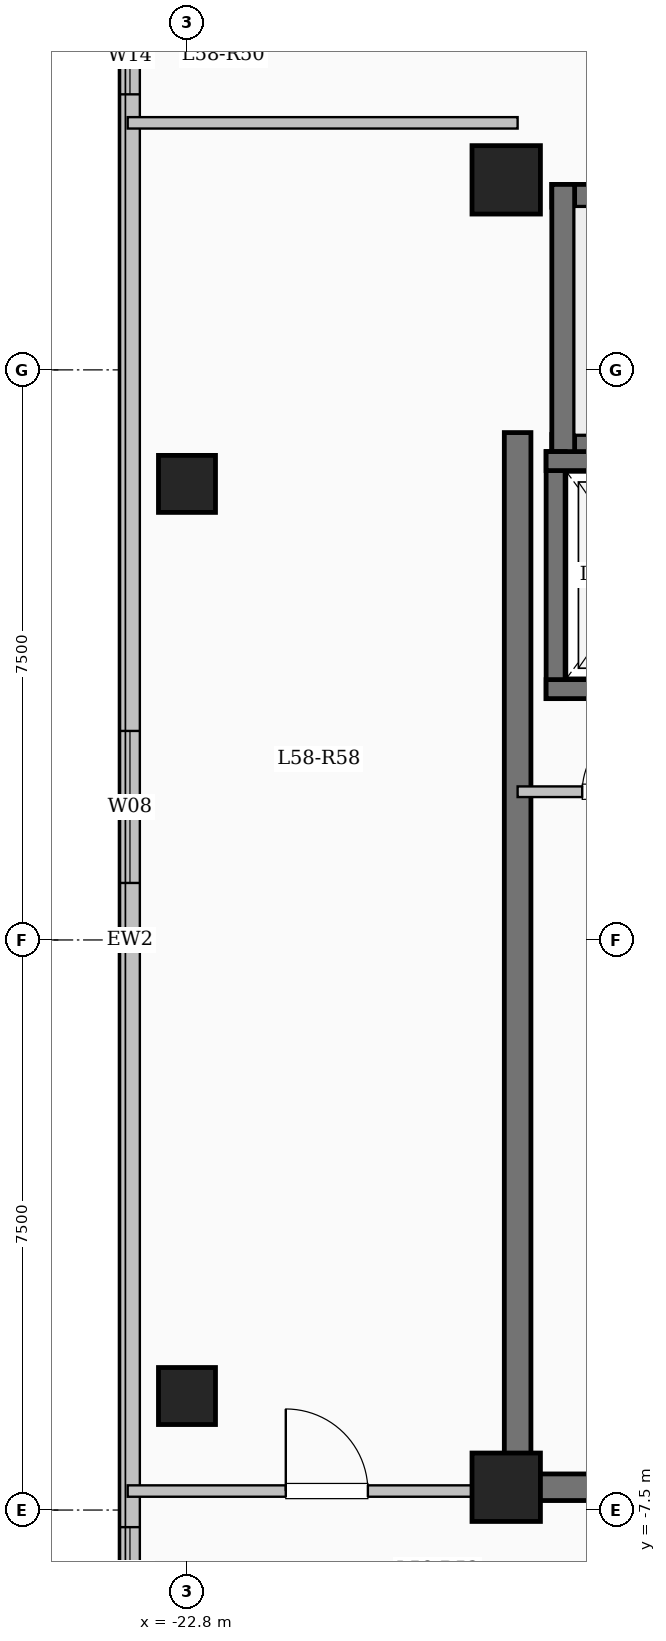
"""IFC4 building model, lengths in metres.
Left out: names, types, materials, properties, quantities, classifications, styles, units other than length and angle.
Written with IfcOpenShell. Run it as: python <this file> out.ifc"""

import sys

from ifc_helpers import new_model, si_unit, direction, frame, frame_2d, origin, origin_2d, place, context, subcontext, project, spatial, rectangle, extrude, element, fill, save


model = new_model("IFC4")
c1 = context("Model", 3, precision=1e-05, world=origin(), true_north=direction((0.0, 1.0)))
c2 = subcontext(c1, "Body", "Model", "MODEL_VIEW")
j1 = project(units=[si_unit("LENGTHUNIT", "METRE"), si_unit("PLANEANGLEUNIT", "RADIAN")], contexts=[c1])
p1 = place(None, origin())
s1 = spatial("IfcSite", under=j1, at=p1, CompositionType="ELEMENT")
p2 = place(p1, origin())
s2 = spatial("IfcBuilding", under=s1, at=p2, CompositionType="ELEMENT")
p3 = place(p2, frame((0.0, 0.0, 213.7)))
s3 = spatial("IfcBuildingStorey", under=s2, at=p3, CompositionType="ELEMENT", Elevation=213.7)
for number, where, z_axis, x_axis in (
    (1, (-18.6, -7.2, 0.0), (0.0, 0.0, 1.0), (1.0, 0.0, 0.0)),
    (2, (-18.6, 10.0, 0.0), (0.0, 0.0, 1.0), (1.0, 0.0, 0.0)),
):
    element("IfcColumn", number, at=place(p3, frame(where, z_axis=z_axis, x_axis=x_axis)), inside=s3, PredefinedType="COLUMN", context=c2, shape_type="SweptSolid", body=[
        extrude(rectangle(XDim=0.9, YDim=0.9, at=origin_2d()), origin(), (0.0, 0.0, 1.0), 3.35),
    ])
for number, where, z_axis, x_axis in (
    (3, (-22.8, -6.0, 0.0), (0.0, 0.0, 1.0), (1.0, 0.0, 0.0)),
    (4, (-22.8, 6.0, 0.0), (0.0, 0.0, 1.0), (1.0, 0.0, 0.0)),
):
    element("IfcColumn", number, at=place(p3, frame(where, z_axis=z_axis, x_axis=x_axis)), inside=s3, PredefinedType="COLUMN", context=c2, shape_type="SweptSolid", body=[
        extrude(rectangle(XDim=0.75, YDim=0.75, at=origin_2d()), origin(), (0.0, 0.0, 1.0), 3.35),
    ])
p4 = place(p3, frame((-23.55, -17.25, 0.0), z_axis=(0.0, 0.0, 1.0), x_axis=(0.0, 1.0, 0.0)))
e5 = element("IfcWall", 5, at=p4, inside=s3, PredefinedType="SOLIDWALL", context=c2, shape_type="SweptSolid", body=[
    extrude(rectangle(XDim=34.5, YDim=0.26, at=frame_2d((17.25, 0.0))), origin(), (0.0, 0.0, 1.0), 3.1),
])
p5 = place(p4, frame((2.825, 0.0, 0.9)))
e6 = element("IfcOpeningElement", 6, at=p5, cuts=e5, PredefinedType="OPENING", context=c2, shape_type="SweptSolid", body=[
    extrude(rectangle(XDim=2.2, YDim=1.75, at=frame_2d((1.1, 0.875))), frame((0.0, 0.14, 0.0), z_axis=(0.0, -1.0, 0.0), x_axis=(1.0, 0.0, 0.0)), (0.0, 0.0, 1.0), 0.28),
])
p6 = place(p4, frame((8.325, 0.0, 0.95)))
e7 = element("IfcOpeningElement", 7, at=p6, cuts=e5, PredefinedType="OPENING", context=c2, shape_type="SweptSolid", body=[
    extrude(rectangle(XDim=1.2, YDim=1.5, at=frame_2d((0.6, 0.75))), frame((0.0, 0.14, 0.0), z_axis=(0.0, -1.0, 0.0), x_axis=(1.0, 0.0, 0.0)), (0.0, 0.0, 1.0), 0.28),
])
p7 = place(p4, frame((18.0, 0.0, 0.9)))
e8 = element("IfcOpeningElement", 8, at=p7, cuts=e5, PredefinedType="OPENING", context=c2, shape_type="SweptSolid", body=[
    extrude(rectangle(XDim=2.0, YDim=1.7, at=frame_2d((1.0, 0.85))), frame((0.0, 0.14, 0.0), z_axis=(0.0, -1.0, 0.0), x_axis=(1.0, 0.0, 0.0)), (0.0, 0.0, 1.0), 0.28),
])
p8 = place(p4, frame((28.375, 0.0, 0.95)))
e9 = element("IfcOpeningElement", 9, at=p8, cuts=e5, PredefinedType="OPENING", context=c2, shape_type="SweptSolid", body=[
    extrude(rectangle(XDim=1.0, YDim=1.5, at=frame_2d((0.5, 0.75))), frame((0.0, 0.14, 0.0), z_axis=(0.0, -1.0, 0.0), x_axis=(1.0, 0.0, 0.0)), (0.0, 0.0, 1.0), 0.28),
])
p9 = place(p4, frame((31.125, 0.0, 0.9)))
e10 = element("IfcOpeningElement", 10, at=p9, cuts=e5, PredefinedType="OPENING", context=c2, shape_type="SweptSolid", body=[
    extrude(rectangle(XDim=2.0, YDim=1.7, at=frame_2d((1.0, 0.85))), frame((0.0, 0.14, 0.0), z_axis=(0.0, -1.0, 0.0), x_axis=(1.0, 0.0, 0.0)), (0.0, 0.0, 1.0), 0.28),
])
p10 = place(p3, frame((-18.0, 9.79, 0.0), z_axis=(0.0, 0.0, 1.0), x_axis=(1.0, 0.0, 0.0)))
e11 = element("IfcWall", 11, at=p10, inside=s3, PredefinedType="SHEAR", context=c2, shape_type="SweptSolid", body=[
    extrude(rectangle(XDim=8.0, YDim=0.3, at=frame_2d((4.0, 0.0))), origin(), (0.0, 0.0, 1.0), 3.35),
])
p11 = place(p3, frame((-18.0, 6.5, 0.0), z_axis=(0.0, 0.0, 1.0), x_axis=(1.0, 0.0, 0.0)))
e12 = element("IfcWall", 12, at=p11, inside=s3, PredefinedType="SHEAR", context=c2, shape_type="SweptSolid", body=[
    extrude(rectangle(XDim=8.0, YDim=0.3, at=frame_2d((4.0, 0.0))), origin(), (0.0, 0.0, 1.0), 3.35),
])
p12 = place(p11, frame((6.45, 0.0, 0.0)))
e13 = element("IfcOpeningElement", 13, at=p12, cuts=e12, PredefinedType="OPENING", context=c2, shape_type="SweptSolid", body=[
    extrude(rectangle(XDim=1.0, YDim=2.15, at=frame_2d((0.5, 1.075))), frame((0.0, 0.16, 0.0), z_axis=(0.0, -1.0, 0.0), x_axis=(1.0, 0.0, 0.0)), (0.0, 0.0, 1.0), 0.32),
])
p13 = place(p3, frame((-17.85, 6.35, 0.0), z_axis=(0.0, 0.0, 1.0), x_axis=(0.0, 1.0, 0.0)))
e14 = element("IfcWall", 14, at=p13, inside=s3, PredefinedType="SHEAR", context=c2, shape_type="SweptSolid", body=[
    extrude(rectangle(XDim=3.59, YDim=0.3, at=frame_2d((1.795, 0.0))), origin(), (0.0, 0.0, 1.0), 3.35),
])
p14 = place(p3, frame((-17.95, 3.175, 0.0), z_axis=(0.0, 0.0, 1.0), x_axis=(0.0, 1.0, 0.0)))
e15 = element("IfcWall", 15, at=p14, inside=s3, PredefinedType="SHEAR", context=c2, shape_type="SweptSolid", body=[
    extrude(rectangle(XDim=3.25, YDim=0.25, at=frame_2d((1.625, 0.0))), origin(), (0.0, 0.0, 1.0), 3.35),
])
for number, where, z_axis, x_axis in (
    (16, (-18.075, 3.3, 0.0), (0.0, 0.0, 1.0), (1.0, 0.0, 0.0)),
    (17, (-18.075, 6.3, 0.0), (0.0, 0.0, 1.0), (1.0, 0.0, 0.0)),
):
    element("IfcWall", number, at=place(p3, frame(where, z_axis=z_axis, x_axis=x_axis)), inside=s3, PredefinedType="SHEAR", context=c2, shape_type="SweptSolid", body=[
        extrude(rectangle(XDim=2.55, YDim=0.25, at=frame_2d((1.275, 0.0))), origin(), (0.0, 0.0, 1.0), 3.35),
    ])
p15 = place(p3, frame((-18.45, -7.375, 0.0), z_axis=(0.0, 0.0, 1.0), x_axis=(0.0, 1.0, 0.0)))
e18 = element("IfcWall", 18, at=p15, inside=s3, PredefinedType="SHEAR", context=c2, shape_type="SweptSolid", body=[
    extrude(rectangle(XDim=14.05, YDim=0.35, at=frame_2d((7.025, 0.0))), origin(), (0.0, 0.0, 1.0), 3.35),
])
p16 = place(p3, frame((-18.625, -7.2, 0.0), z_axis=(0.0, 0.0, 1.0), x_axis=(1.0, 0.0, 0.0)))
e19 = element("IfcWall", 19, at=p16, inside=s3, PredefinedType="SHEAR", context=c2, shape_type="SweptSolid", body=[
    extrude(rectangle(XDim=6.0, YDim=0.35, at=frame_2d((3.0, 0.0))), origin(), (0.0, 0.0, 1.0), 3.35),
])
p17 = place(p16, frame((1.725, 0.0, 0.0)))
e20 = element("IfcOpeningElement", 20, at=p17, cuts=e19, PredefinedType="OPENING", context=c2, shape_type="SweptSolid", body=[
    extrude(rectangle(XDim=1.12, YDim=2.15, at=frame_2d((0.56, 1.075))), frame((0.0, 0.185, 0.0), z_axis=(0.0, -1.0, 0.0), x_axis=(1.0, 0.0, 0.0)), (0.0, 0.0, 1.0), 0.37),
])
p18 = place(p3, frame((-18.45, 1.95, 0.0), z_axis=(0.0, 0.0, 1.0), x_axis=(1.0, 0.0, 0.0)))
e21 = element("IfcWall", 21, at=p18, inside=s3, PredefinedType="PARTITIONING", context=c2, shape_type="SweptSolid", body=[
    extrude(rectangle(XDim=3.15, YDim=0.14, at=frame_2d((1.575, 0.0))), origin(), (0.0, 0.0, 1.0), 3.1),
])
p19 = place(p18, frame((0.85, 0.0, 0.0)))
e22 = element("IfcOpeningElement", 22, at=p19, cuts=e21, PredefinedType="OPENING", context=c2, shape_type="SweptSolid", body=[
    extrude(rectangle(XDim=0.9, YDim=2.08, at=frame_2d((0.45, 1.04))), frame((0.0, 0.08, 0.0), z_axis=(0.0, -1.0, 0.0), x_axis=(1.0, 0.0, 0.0)), (0.0, 0.0, 1.0), 0.16),
])
p20 = place(p3, frame((-23.58, -7.25, 0.0), z_axis=(0.0, 0.0, 1.0), x_axis=(1.0, 0.0, 0.0)))
e23 = element("IfcWall", 23, at=p20, inside=s3, PredefinedType="PARTITIONING", context=c2, shape_type="SweptSolid", body=[
    extrude(rectangle(XDim=5.13, YDim=0.15, at=frame_2d((2.565, 0.0))), origin(), (0.0, 0.0, 1.0), 3.1),
])
p21 = place(p20, frame((2.08, 0.0, 0.0)))
e24 = element("IfcOpeningElement", 24, at=p21, cuts=e23, PredefinedType="OPENING", context=c2, shape_type="SweptSolid", body=[
    extrude(rectangle(XDim=1.08, YDim=2.15, at=frame_2d((0.54, 1.075))), frame((0.0, 0.085, 0.0), z_axis=(0.0, -1.0, 0.0), x_axis=(1.0, 0.0, 0.0)), (0.0, 0.0, 1.0), 0.17),
])
p22 = place(p3, frame((-23.58, 10.75, 0.0), z_axis=(0.0, 0.0, 1.0), x_axis=(1.0, 0.0, 0.0)))
e25 = element("IfcWall", 25, at=p22, inside=s3, PredefinedType="PARTITIONING", context=c2, shape_type="SweptSolid", body=[
    extrude(rectangle(XDim=5.13, YDim=0.15, at=frame_2d((2.565, 0.0))), origin(), (0.0, 0.0, 1.0), 3.1),
])
p23 = place(p6, origin())
e26 = element("IfcWindow", 26, at=p23, inside=s3, PartitioningType="SINGLE_PANEL", PredefinedType="WINDOW", context=c2, shape_type="SweptSolid", body=[
    extrude(rectangle(XDim=1.2, YDim=1.5, at=frame_2d((0.6, 0.75))), frame((0.0, 0.03, 0.0), z_axis=(0.0, -1.0, 0.0), x_axis=(1.0, 0.0, 0.0)), (0.0, 0.0, 1.0), 0.06),
])
fill(e7, e26)
p24 = place(p7, origin())
e27 = element("IfcWindow", 27, at=p24, inside=s3, PartitioningType="SINGLE_PANEL", PredefinedType="WINDOW", context=c2, shape_type="SweptSolid", body=[
    extrude(rectangle(XDim=2.0, YDim=1.7, at=frame_2d((1.0, 0.85))), frame((0.0, 0.03, 0.0), z_axis=(0.0, -1.0, 0.0), x_axis=(1.0, 0.0, 0.0)), (0.0, 0.0, 1.0), 0.06),
])
fill(e8, e27)
p25 = place(p8, origin())
e28 = element("IfcWindow", 28, at=p25, inside=s3, PartitioningType="SINGLE_PANEL", PredefinedType="WINDOW", context=c2, shape_type="SweptSolid", body=[
    extrude(rectangle(XDim=1.0, YDim=1.5, at=frame_2d((0.5, 0.75))), frame((0.0, 0.03, 0.0), z_axis=(0.0, -1.0, 0.0), x_axis=(1.0, 0.0, 0.0)), (0.0, 0.0, 1.0), 0.06),
])
fill(e9, e28)
p26 = place(p19, origin())
e29 = element("IfcDoor", 29, at=p26, inside=s3, OperationType="SINGLE_SWING_RIGHT", PredefinedType="DOOR", context=c2, shape_type="SweptSolid", body=[
    extrude(rectangle(XDim=0.9, YDim=2.08, at=frame_2d((0.45, 1.04))), frame((0.0, 0.025, 0.0), z_axis=(0.0, -1.0, 0.0), x_axis=(1.0, 0.0, 0.0)), (0.0, 0.0, 1.0), 0.05),
])
fill(e22, e29)
p27 = place(p21, origin())
e30 = element("IfcDoor", 30, at=p27, inside=s3, OperationType="SINGLE_SWING_LEFT", PredefinedType="DOOR", context=c2, shape_type="SweptSolid", body=[
    extrude(rectangle(XDim=1.08, YDim=2.15, at=frame_2d((0.54, 1.075))), frame((0.0, 0.025, 0.0), z_axis=(0.0, -1.0, 0.0), x_axis=(1.0, 0.0, 0.0)), (0.0, 0.0, 1.0), 0.05),
])
fill(e24, e30)
save(model, sys.argv[1])
